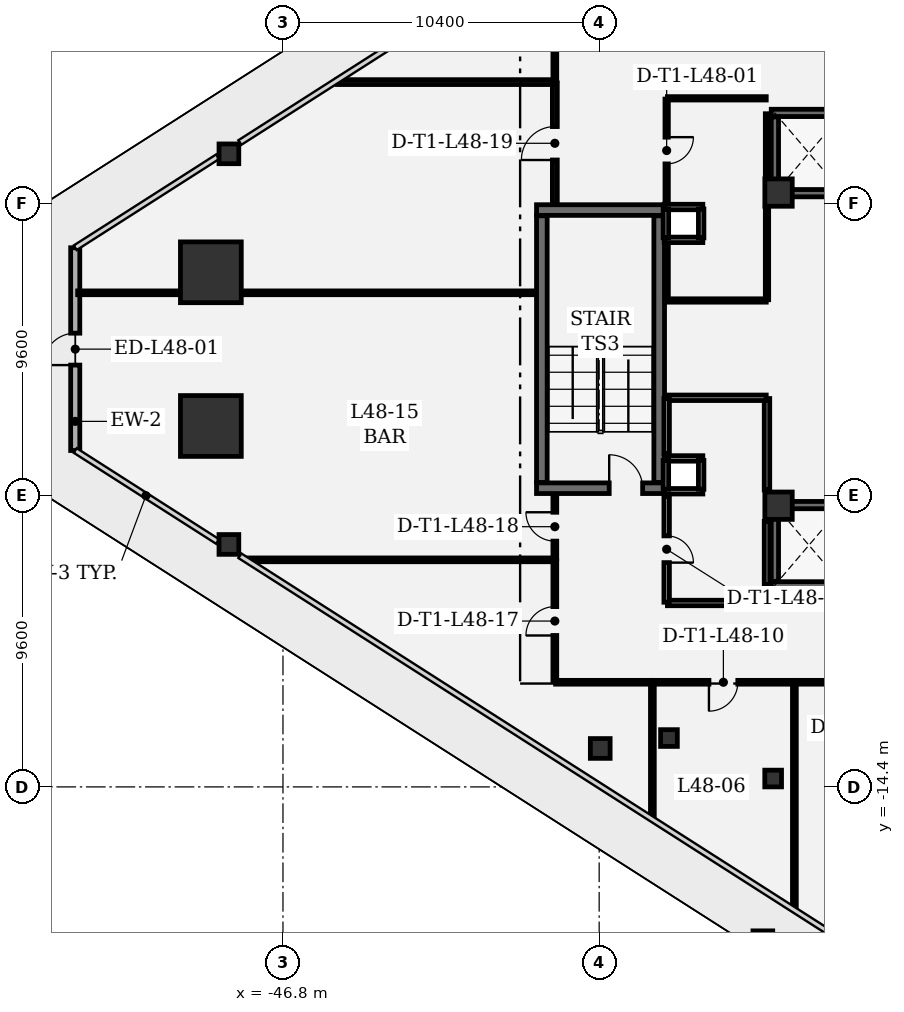
"""IFC4 building model, lengths in metres.
Left out: names, types, materials, properties, quantities, classifications, styles, units other than length and angle.
Written with IfcOpenShell. Run it as: python <this file> out.ifc"""

import sys

from ifc_helpers import new_model, si_unit, direction, frame, frame_2d, origin, origin_2d, place, context, subcontext, project, spatial, rectangle, extrude, element, fill, save


model = new_model("IFC4")
c1 = context("Model", 3, precision=1e-05, world=origin(), true_north=direction((0.0, 1.0)))
c2 = subcontext(c1, "Body", "Model", "MODEL_VIEW")
j1 = project(units=[si_unit("LENGTHUNIT", "METRE"), si_unit("PLANEANGLEUNIT", "RADIAN")], contexts=[c1])
p1 = place(None, origin())
s1 = spatial("IfcSite", under=j1, at=p1, CompositionType="ELEMENT")
p2 = place(p1, origin())
s2 = spatial("IfcBuilding", under=s1, at=p2, CompositionType="ELEMENT")
p3 = place(p2, frame((0.0, 0.0, 209.1)))
s3 = spatial("IfcBuildingStorey", under=s2, at=p3, CompositionType="ELEMENT", Elevation=209.1)
for number, where, z_axis, x_axis in (
    (1, (-49.172, 2.528, 0.0), (0.0, 0.0, 1.0), (1.0, 0.0, 0.0)),
    (2, (-49.172, -2.528, 0.0), (0.0, 0.0, 1.0), (1.0, 0.0, 0.0)),
):
    element("IfcColumn", number, at=place(p3, frame(where, z_axis=z_axis, x_axis=x_axis)), inside=s3, PredefinedType="COLUMN", context=c2, shape_type="SweptSolid", body=[
        extrude(rectangle(XDim=2.0, YDim=2.0, at=origin_2d()), origin(), (0.0, 0.0, 1.0), 4.05),
    ])
for number, where, z_axis, x_axis in (
    (3, (-30.5, 5.15, 0.0), (0.0, 0.0, 1.0), (1.0, 0.0, 0.0)),
    (4, (-30.5, -5.15, 0.0), (0.0, 0.0, 1.0), (1.0, 0.0, 0.0)),
):
    element("IfcColumn", number, at=place(p3, frame(where, z_axis=z_axis, x_axis=x_axis)), inside=s3, PredefinedType="COLUMN", context=c2, shape_type="SweptSolid", body=[
        extrude(rectangle(XDim=0.9, YDim=0.9, at=origin_2d()), origin(), (0.0, 0.0, 1.0), 4.05),
    ])
for number, where, z_axis, x_axis in (
    (5, (-31.016, -19.46, 0.0), (0.0, 0.0, 1.0), (1.0, 0.0, 0.0)),
    (6, (-48.578, 6.425, 0.0), (0.0, 0.0, 1.0), (1.0, 0.0, 0.0)),
    (7, (-48.578, -6.425, 0.0), (0.0, 0.0, 1.0), (1.0, 0.0, 0.0)),
    (8, (-36.365, -13.135, 0.0), (0.0, 0.0, 1.0), (1.0, 0.0, 0.0)),
):
    element("IfcColumn", number, at=place(p3, frame(where, z_axis=z_axis, x_axis=x_axis)), inside=s3, PredefinedType="COLUMN", context=c2, shape_type="SweptSolid", body=[
        extrude(rectangle(XDim=0.65, YDim=0.65, at=origin_2d()), origin(), (0.0, 0.0, 1.0), 4.05),
    ])
for number, where, z_axis, x_axis in (
    (9, (-34.104, -12.792, 0.0), (0.0, 0.0, 1.0), (1.0, 0.0, 0.0)),
    (10, (-30.677, -14.124, 0.0), (0.0, 0.0, 1.0), (1.0, 0.0, 0.0)),
):
    element("IfcColumn", number, at=place(p3, frame(where, z_axis=z_axis, x_axis=x_axis)), inside=s3, PredefinedType="COLUMN", context=c2, shape_type="SweptSolid", body=[
        extrude(rectangle(XDim=0.55, YDim=0.55, at=origin_2d()), origin(), (0.0, 0.0, 1.0), 4.05),
    ])
p4 = place(p3, frame((-53.633, -3.335, 0.0), z_axis=(0.0, 0.0, 1.0), x_axis=(0.0, 1.0, 0.0)))
e11 = element("IfcWall", 11, at=p4, inside=s3, PredefinedType="SOLIDWALL", context=c2, shape_type="SweptSolid", body=[
    extrude(rectangle(XDim=6.67, YDim=0.3, at=frame_2d((3.335, 0.0))), origin(), (0.0, 0.0, 1.0), 3.78),
])
p5 = place(p4, frame((2.81, 0.0, 0.0)))
e12 = element("IfcOpeningElement", 12, at=p5, cuts=e11, PredefinedType="OPENING", context=c2, shape_type="SweptSolid", body=[
    extrude(rectangle(XDim=1.05, YDim=2.2, at=frame_2d((0.525, 1.1))), frame((0.0, 0.16, 0.0), z_axis=(0.0, -1.0, 0.0), x_axis=(1.0, 0.0, 0.0)), (0.0, 0.0, 1.0), 0.32),
])
p6 = place(p3, frame((-38.46, -4.575, 0.0), z_axis=(0.0, 0.0, 1.0), x_axis=(1.0, 0.0, 0.0)))
e13 = element("IfcWall", 13, at=p6, inside=s3, PredefinedType="SHEAR", context=c2, shape_type="SweptSolid", body=[
    extrude(rectangle(XDim=4.21, YDim=0.35, at=frame_2d((2.105, 0.0))), origin(), (0.0, 0.0, 1.0), 3.78),
])
p7 = place(p6, frame((2.39, 0.0, 0.0)))
e14 = element("IfcOpeningElement", 14, at=p7, cuts=e13, PredefinedType="OPENING", context=c2, shape_type="SweptSolid", body=[
    extrude(rectangle(XDim=1.1, YDim=2.2, at=frame_2d((0.55, 1.1))), frame((0.0, 0.185, 0.0), z_axis=(0.0, -1.0, 0.0), x_axis=(1.0, 0.0, 0.0)), (0.0, 0.0, 1.0), 0.37),
])
p8 = place(p3, frame((-34.25, 4.575, 0.0), z_axis=(0.0, 0.0, 1.0), x_axis=(-1.0, 0.0, 0.0)))
e15 = element("IfcWall", 15, at=p8, inside=s3, PredefinedType="SHEAR", context=c2, shape_type="SweptSolid", body=[
    extrude(rectangle(XDim=4.21, YDim=0.35, at=frame_2d((2.105, 0.0))), origin(), (0.0, 0.0, 1.0), 3.78),
])
for number, where, z_axis, x_axis in (
    (16, (-34.425, -4.385, 0.0), (0.0, 0.0, 1.0), (0.0, 1.0, 0.0)),
    (17, (-38.285, 4.385, 0.0), (0.0, 0.0, 1.0), (0.0, -1.0, 0.0)),
):
    element("IfcWall", number, at=place(p3, frame(where, z_axis=z_axis, x_axis=x_axis)), inside=s3, PredefinedType="SHEAR", context=c2, shape_type="SweptSolid", body=[
        extrude(rectangle(XDim=8.77, YDim=0.35, at=frame_2d((4.385, 0.0))), origin(), (0.0, 0.0, 1.0), 3.78),
    ])
for number, where, z_axis, x_axis in (
    (18, (-28.26, 5.13, 0.0), (0.0, 0.0, 1.0), (-1.0, 0.0, 0.0)),
    (19, (-30.74, 7.77, 0.0), (0.0, 0.0, 1.0), (1.0, 0.0, 0.0)),
):
    element("IfcWall", number, at=place(p3, frame(where, z_axis=z_axis, x_axis=x_axis)), inside=s3, PredefinedType="SHEAR", context=c2, shape_type="SweptSolid", body=[
        extrude(rectangle(XDim=2.48, YDim=0.24, at=frame_2d((1.24, 0.0))), origin(), (0.0, 0.0, 1.0), 3.78),
    ])
p9 = place(p3, frame((-30.62, 5.262, 0.0), z_axis=(0.0, 0.0, 1.0), x_axis=(0.0, 1.0, 0.0)))
e20 = element("IfcWall", 20, at=p9, inside=s3, PredefinedType="SHEAR", context=c2, shape_type="SweptSolid", body=[
    extrude(rectangle(XDim=2.376, YDim=0.24, at=frame_2d((1.188, 0.0))), origin(), (0.0, 0.0, 1.0), 3.78),
])
for number, where, z_axis, x_axis in (
    (21, (-28.26, -7.77, 0.0), (0.0, 0.0, 1.0), (-1.0, 0.0, 0.0)),
    (22, (-30.74, -5.13, 0.0), (0.0, 0.0, 1.0), (1.0, 0.0, 0.0)),
):
    element("IfcWall", number, at=place(p3, frame(where, z_axis=z_axis, x_axis=x_axis)), inside=s3, PredefinedType="SHEAR", context=c2, shape_type="SweptSolid", body=[
        extrude(rectangle(XDim=2.48, YDim=0.24, at=frame_2d((1.24, 0.0))), origin(), (0.0, 0.0, 1.0), 3.78),
    ])
p10 = place(p3, frame((-30.62, -7.638, 0.0), z_axis=(0.0, 0.0, 1.0), x_axis=(0.0, 1.0, 0.0)))
e23 = element("IfcWall", 23, at=p10, inside=s3, PredefinedType="SHEAR", context=c2, shape_type="SweptSolid", body=[
    extrude(rectangle(XDim=2.376, YDim=0.24, at=frame_2d((1.188, 0.0))), origin(), (0.0, 0.0, 1.0), 3.78),
])
for number, where, z_axis, x_axis in (
    (24, (-32.99, 3.595, 0.0), (0.0, 0.0, 1.0), (-1.0, 0.0, 0.0)),
    (25, (-34.26, 4.675, 0.0), (0.0, 0.0, 1.0), (1.0, 0.0, 0.0)),
):
    element("IfcWall", number, at=place(p3, frame(where, z_axis=z_axis, x_axis=x_axis)), inside=s3, PredefinedType="PARTITIONING", context=c2, shape_type="SweptSolid", body=[
        extrude(rectangle(XDim=1.27, YDim=0.18, at=frame_2d((0.635, 0.0))), origin(), (0.0, 0.0, 1.0), 3.78),
    ])
for number, where, z_axis, x_axis in (
    (26, (-34.205, 3.66, 0.0), (0.0, 0.0, 1.0), (0.0, 1.0, 0.0)),
    (27, (-33.045, 4.61, 0.0), (0.0, 0.0, 1.0), (0.0, -1.0, 0.0)),
):
    element("IfcWall", number, at=place(p3, frame(where, z_axis=z_axis, x_axis=x_axis)), inside=s3, PredefinedType="PARTITIONING", context=c2, shape_type="SweptSolid", body=[
        extrude(rectangle(XDim=0.95, YDim=0.18, at=frame_2d((0.475, 0.0))), origin(), (0.0, 0.0, 1.0), 3.78),
    ])
for number, where, z_axis, x_axis in (
    (28, (-32.99, -4.675, 0.0), (0.0, 0.0, 1.0), (-1.0, 0.0, 0.0)),
    (29, (-34.26, -3.595, 0.0), (0.0, 0.0, 1.0), (1.0, 0.0, 0.0)),
):
    element("IfcWall", number, at=place(p3, frame(where, z_axis=z_axis, x_axis=x_axis)), inside=s3, PredefinedType="PARTITIONING", context=c2, shape_type="SweptSolid", body=[
        extrude(rectangle(XDim=1.27, YDim=0.18, at=frame_2d((0.635, 0.0))), origin(), (0.0, 0.0, 1.0), 3.78),
    ])
for number, where, z_axis, x_axis in (
    (30, (-34.205, -4.61, 0.0), (0.0, 0.0, 1.0), (0.0, 1.0, 0.0)),
    (31, (-33.045, -3.66, 0.0), (0.0, 0.0, 1.0), (0.0, -1.0, 0.0)),
):
    element("IfcWall", number, at=place(p3, frame(where, z_axis=z_axis, x_axis=x_axis)), inside=s3, PredefinedType="PARTITIONING", context=c2, shape_type="SweptSolid", body=[
        extrude(rectangle(XDim=0.95, YDim=0.18, at=frame_2d((0.475, 0.0))), origin(), (0.0, 0.0, 1.0), 3.78),
    ])
p11 = place(p3, frame((-34.155, 1.6, 0.0), z_axis=(0.0, 0.0, 1.0), x_axis=(1.0, 0.0, 0.0)))
e32 = element("IfcWall", 32, at=p11, inside=s3, PredefinedType="PARTITIONING", context=c2, shape_type="SweptSolid", body=[
    extrude(rectangle(XDim=3.25, YDim=0.11, at=frame_2d((1.625, 0.0))), origin(), (0.0, 0.0, 1.0), 3.78),
])
p12 = place(p3, frame((-30.88, 1.625, 0.0), z_axis=(0.0, 0.0, 1.0), x_axis=(0.0, 1.0, 0.0)))
e33 = element("IfcWall", 33, at=p12, inside=s3, PredefinedType="PARTITIONING", context=c2, shape_type="SweptSolid", body=[
    extrude(rectangle(XDim=3.01, YDim=0.11, at=frame_2d((1.505, 0.0))), origin(), (0.0, 0.0, 1.0), 3.78),
])
p13 = place(p3, frame((-30.88, 5.665, 0.0), z_axis=(0.0, 0.0, 1.0), x_axis=(0.0, 1.0, 0.0)))
e34 = element("IfcWall", 34, at=p13, inside=s3, PredefinedType="PARTITIONING", context=c2, shape_type="SweptSolid", body=[
    extrude(rectangle(XDim=2.078, YDim=0.11, at=frame_2d((1.039, 0.0))), origin(), (0.0, 0.0, 1.0), 3.78),
])
p14 = place(p3, frame((-30.905, 8.25, 0.0), z_axis=(0.0, 0.0, 1.0), x_axis=(-1.0, 0.0, 0.0)))
e35 = element("IfcWall", 35, at=p14, inside=s3, PredefinedType="PARTITIONING", context=c2, shape_type="SweptSolid", body=[
    extrude(rectangle(XDim=3.25, YDim=0.11, at=frame_2d((1.625, 0.0))), origin(), (0.0, 0.0, 1.0), 3.78),
])
p15 = place(p3, frame((-34.18, 8.225, 0.0), z_axis=(0.0, 0.0, 1.0), x_axis=(0.0, -1.0, 0.0)))
e36 = element("IfcWall", 36, at=p15, inside=s3, PredefinedType="PARTITIONING", context=c2, shape_type="SweptSolid", body=[
    extrude(rectangle(XDim=3.385, YDim=0.11, at=frame_2d((1.692, 0.0))), origin(), (0.0, 0.0, 1.0), 3.78),
])
p16 = place(p15, frame((1.252, 0.0, 0.0)))
e37 = element("IfcOpeningElement", 37, at=p16, cuts=e36, PredefinedType="OPENING", context=c2, shape_type="SweptSolid", body=[
    extrude(rectangle(XDim=0.88, YDim=2.1, at=frame_2d((0.44, 1.05))), frame((0.0, 0.065, 0.0), z_axis=(0.0, -1.0, 0.0), x_axis=(1.0, 0.0, 0.0)), (0.0, 0.0, 1.0), 0.13),
])
p17 = place(p3, frame((-34.18, 3.43, 0.0), z_axis=(0.0, 0.0, 1.0), x_axis=(0.0, -1.0, 0.0)))
e38 = element("IfcWall", 38, at=p17, inside=s3, PredefinedType="PARTITIONING", context=c2, shape_type="SweptSolid", body=[
    extrude(rectangle(XDim=1.805, YDim=0.11, at=frame_2d((0.902, 0.0))), origin(), (0.0, 0.0, 1.0), 3.78),
])
p18 = place(p3, frame((-34.155, -8.35, 0.0), z_axis=(0.0, 0.0, 1.0), x_axis=(1.0, 0.0, 0.0)))
e39 = element("IfcWall", 39, at=p18, inside=s3, PredefinedType="PARTITIONING", context=c2, shape_type="SweptSolid", body=[
    extrude(rectangle(XDim=3.25, YDim=0.18, at=frame_2d((1.625, 0.0))), origin(), (0.0, 0.0, 1.0), 3.344),
])
p19 = place(p3, frame((-30.88, -7.743, 0.0), z_axis=(0.0, 0.0, 1.0), x_axis=(0.0, 1.0, 0.0)))
e40 = element("IfcWall", 40, at=p19, inside=s3, PredefinedType="PARTITIONING", context=c2, shape_type="SweptSolid", body=[
    extrude(rectangle(XDim=2.078, YDim=0.18, at=frame_2d((1.039, 0.0))), origin(), (0.0, 0.0, 1.0), 3.78),
])
p20 = place(p3, frame((-30.88, -4.635, 0.0), z_axis=(0.0, 0.0, 1.0), x_axis=(0.0, 1.0, 0.0)))
e41 = element("IfcWall", 41, at=p20, inside=s3, PredefinedType="PARTITIONING", context=c2, shape_type="SweptSolid", body=[
    extrude(rectangle(XDim=3.01, YDim=0.18, at=frame_2d((1.505, 0.0))), origin(), (0.0, 0.0, 1.0), 3.78),
])
p21 = place(p3, frame((-30.905, -1.6, 0.0), z_axis=(0.0, 0.0, 1.0), x_axis=(-1.0, 0.0, 0.0)))
e42 = element("IfcWall", 42, at=p21, inside=s3, PredefinedType="PARTITIONING", context=c2, shape_type="SweptSolid", body=[
    extrude(rectangle(XDim=3.25, YDim=0.18, at=frame_2d((1.625, 0.0))), origin(), (0.0, 0.0, 1.0), 3.78),
])
p22 = place(p3, frame((-34.18, -1.625, 0.0), z_axis=(0.0, 0.0, 1.0), x_axis=(0.0, -1.0, 0.0)))
e43 = element("IfcWall", 43, at=p22, inside=s3, PredefinedType="PARTITIONING", context=c2, shape_type="SweptSolid", body=[
    extrude(rectangle(XDim=1.805, YDim=0.18, at=frame_2d((0.902, 0.0))), origin(), (0.0, 0.0, 1.0), 3.78),
])
p23 = place(p3, frame((-34.18, -4.84, 0.0), z_axis=(0.0, 0.0, 1.0), x_axis=(0.0, -1.0, 0.0)))
e44 = element("IfcWall", 44, at=p23, inside=s3, PredefinedType="PARTITIONING", context=c2, shape_type="SweptSolid", body=[
    extrude(rectangle(XDim=3.485, YDim=0.18, at=frame_2d((1.743, 0.0))), origin(), (0.0, 0.0, 1.0), 3.78),
])
p24 = place(p23, frame((1.302, 0.0, 0.0)))
e45 = element("IfcOpeningElement", 45, at=p24, cuts=e44, PredefinedType="OPENING", context=c2, shape_type="SweptSolid", body=[
    extrude(rectangle(XDim=0.88, YDim=2.1, at=frame_2d((0.44, 1.05))), frame((0.0, 0.1, 0.0), z_axis=(0.0, -1.0, 0.0), x_axis=(1.0, 0.0, 0.0)), (0.0, 0.0, 1.0), 0.2),
])
p25 = place(p3, frame((-30.004, -10.958, 0.0), z_axis=(0.0, 0.0, 1.0), x_axis=(-1.0, 0.0, 0.0)))
e46 = element("IfcWall", 46, at=p25, inside=s3, PredefinedType="PARTITIONING", context=c2, shape_type="SweptSolid", body=[
    extrude(rectangle(XDim=4.621, YDim=0.125, at=frame_2d((2.311, 0.0))), origin(), (0.0, 0.0, 1.0), 2.9),
])
p26 = place(p25, frame((1.835, 0.0, 0.0)))
e47 = element("IfcOpeningElement", 47, at=p26, cuts=e46, PredefinedType="OPENING", context=c2, shape_type="SweptSolid", body=[
    extrude(rectangle(XDim=0.95, YDim=2.15, at=frame_2d((0.475, 1.075))), frame((0.0, 0.073, 0.0), z_axis=(0.0, -1.0, 0.0), x_axis=(1.0, 0.0, 0.0)), (0.0, 0.0, 1.0), 0.145),
])
p27 = place(p3, frame((-34.65, -10.983, 0.0), z_axis=(0.0, 0.0, 1.0), x_axis=(0.0, -1.0, 0.0)))
e48 = element("IfcWall", 48, at=p27, inside=s3, PredefinedType="PARTITIONING", context=c2, shape_type="SweptSolid", body=[
    extrude(rectangle(XDim=4.405, YDim=0.125, at=frame_2d((2.202, 0.0))), origin(), (0.0, 0.0, 1.0), 3.78),
])
p28 = place(p3, frame((-29.979, -18.373, 0.0), z_axis=(0.0, 0.0, 1.0), x_axis=(0.0, 1.0, 0.0)))
e49 = element("IfcWall", 49, at=p28, inside=s3, PredefinedType="PARTITIONING", context=c2, shape_type="SweptSolid", body=[
    extrude(rectangle(XDim=7.39, YDim=0.125, at=frame_2d((3.695, 0.0))), origin(), (0.0, 0.0, 1.0), 3.78),
])
p29 = place(p3, frame((-24.943, -10.958, 0.0), z_axis=(0.0, 0.0, 1.0), x_axis=(-1.0, 0.0, 0.0)))
e50 = element("IfcWall", 50, at=p29, inside=s3, PredefinedType="PARTITIONING", context=c2, shape_type="SweptSolid", body=[
    extrude(rectangle(XDim=5.003, YDim=0.125, at=frame_2d((2.501, 0.0))), origin(), (0.0, 0.0, 1.0), 3.78),
])
p30 = place(p29, frame((2.026, 0.0, 0.0)))
e51 = element("IfcOpeningElement", 51, at=p30, cuts=e50, PredefinedType="OPENING", context=c2, shape_type="SweptSolid", body=[
    extrude(rectangle(XDim=0.95, YDim=2.15, at=frame_2d((0.475, 1.075))), frame((0.0, 0.073, 0.0), z_axis=(0.0, -1.0, 0.0), x_axis=(1.0, 0.0, 0.0)), (0.0, 0.0, 1.0), 0.145),
])
p31 = place(p3, frame((-37.833, -10.958, 0.0), z_axis=(0.0, 0.0, 1.0), x_axis=(1.0, 0.0, 0.0)))
e52 = element("IfcWall", 52, at=p31, inside=s3, PredefinedType="PARTITIONING", context=c2, shape_type="SweptSolid", body=[
    extrude(rectangle(XDim=3.15, YDim=0.125, at=frame_2d((1.575, 0.0))), origin(), (0.0, 0.0, 1.0), 2.9),
])
p32 = place(p3, frame((-37.858, -10.933, 0.0), z_axis=(0.0, 0.0, 1.0), x_axis=(0.0, 1.0, 0.0)))
e53 = element("IfcWall", 53, at=p32, inside=s3, PredefinedType="PARTITIONING", context=c2, shape_type="SweptSolid", body=[
    extrude(rectangle(XDim=3.977, YDim=0.125, at=frame_2d((1.989, 0.0))), origin(), (0.0, 0.0, 1.0), 3.78),
])
p33 = place(p32, frame((1.514, 0.0, 0.0)))
e54 = element("IfcOpeningElement", 54, at=p33, cuts=e53, PredefinedType="OPENING", context=c2, shape_type="SweptSolid", body=[
    extrude(rectangle(XDim=0.95, YDim=2.15, at=frame_2d((0.475, 1.075))), frame((0.0, 0.073, 0.0), z_axis=(0.0, -1.0, 0.0), x_axis=(1.0, 0.0, 0.0)), (0.0, 0.0, 1.0), 0.145),
])
p34 = place(p3, frame((-37.883, -6.931, 0.0), z_axis=(0.0, 0.0, 1.0), x_axis=(-1.0, 0.0, 0.0)))
e55 = element("IfcWall", 55, at=p34, inside=s3, PredefinedType="PARTITIONING", context=c2, shape_type="SweptSolid", body=[
    extrude(rectangle(XDim=10.044, YDim=0.125, at=frame_2d((5.022, 0.0))), origin(), (0.0, 0.0, 1.0), 2.9),
])
p35 = place(p3, frame((-37.858, -6.898, 0.0), z_axis=(0.0, 0.0, 1.0), x_axis=(0.0, 1.0, 0.0)))
e56 = element("IfcWall", 56, at=p35, inside=s3, PredefinedType="PARTITIONING", context=c2, shape_type="SweptSolid", body=[
    extrude(rectangle(XDim=2.115, YDim=0.125, at=frame_2d((1.057, 0.0))), origin(), (0.0, 0.0, 1.0), 3.78),
])
p36 = place(p35, frame((0.582, 0.0, 0.0)))
e57 = element("IfcOpeningElement", 57, at=p36, cuts=e56, PredefinedType="OPENING", context=c2, shape_type="SweptSolid", body=[
    extrude(rectangle(XDim=0.95, YDim=2.15, at=frame_2d((0.475, 1.075))), frame((0.0, 0.073, 0.0), z_axis=(0.0, -1.0, 0.0), x_axis=(1.0, 0.0, 0.0)), (0.0, 0.0, 1.0), 0.145),
])
p37 = place(p3, frame((-38.493, 1.853, 0.0), z_axis=(0.0, 0.0, 1.0), x_axis=(-1.0, 0.0, 0.0)))
e58 = element("IfcWall", 58, at=p37, inside=s3, PredefinedType="PARTITIONING", context=c2, shape_type="SweptSolid", body=[
    extrude(rectangle(XDim=9.614, YDim=0.125, at=frame_2d((4.807, 0.0))), origin(), (0.0, 0.0, 1.0), 3.78),
])
p38 = place(p3, frame((-50.237, 1.853, 0.0), z_axis=(0.0, 0.0, 1.0), x_axis=(-1.0, 0.0, 0.0)))
e59 = element("IfcWall", 59, at=p38, inside=s3, PredefinedType="PARTITIONING", context=c2, shape_type="SweptSolid", body=[
    extrude(rectangle(XDim=3.316, YDim=0.125, at=frame_2d((1.658, 0.0))), origin(), (0.0, 0.0, 1.0), 3.78),
])
p39 = place(p3, frame((-37.858, 4.783, 0.0), z_axis=(0.0, 0.0, 1.0), x_axis=(0.0, 1.0, 0.0)))
e60 = element("IfcWall", 60, at=p39, inside=s3, PredefinedType="PARTITIONING", context=c2, shape_type="SweptSolid", body=[
    extrude(rectangle(XDim=3.976, YDim=0.16, at=frame_2d((1.988, 0.0))), origin(), (0.0, 0.0, 1.0), 3.78),
])
p40 = place(p39, frame((1.438, 0.0, 0.0)))
e61 = element("IfcOpeningElement", 61, at=p40, cuts=e60, PredefinedType="OPENING", context=c2, shape_type="SweptSolid", body=[
    extrude(rectangle(XDim=1.1, YDim=2.15, at=frame_2d((0.55, 1.075))), frame((0.0, 0.09, 0.0), z_axis=(0.0, -1.0, 0.0), x_axis=(1.0, 0.0, 0.0)), (0.0, 0.0, 1.0), 0.18),
])
p41 = place(p3, frame((-37.883, 8.784, 0.0), z_axis=(0.0, 0.0, 1.0), x_axis=(-1.0, 0.0, 0.0)))
e62 = element("IfcWall", 62, at=p41, inside=s3, PredefinedType="PARTITIONING", context=c2, shape_type="SweptSolid", body=[
    extrude(rectangle(XDim=7.145, YDim=0.16, at=frame_2d((3.572, 0.0))), origin(), (0.0, 0.0, 1.0), 2.9),
])
p42 = place(p3, frame((-37.858, 8.817, 0.0), z_axis=(0.0, 0.0, 1.0), x_axis=(0.0, 1.0, 0.0)))
e63 = element("IfcWall", 63, at=p42, inside=s3, PredefinedType="PARTITIONING", context=c2, shape_type="SweptSolid", body=[
    extrude(rectangle(XDim=1.917, YDim=0.125, at=frame_2d((0.958, 0.0))), origin(), (0.0, 0.0, 1.0), 3.78),
])
p43 = place(p5, origin())
e64 = element("IfcDoor", 64, at=p43, inside=s3, OperationType="SINGLE_SWING_LEFT", PredefinedType="DOOR", context=c2, shape_type="SweptSolid", body=[
    extrude(rectangle(XDim=1.05, YDim=2.2, at=frame_2d((0.525, 1.1))), frame((0.0, 0.025, 0.0), z_axis=(0.0, -1.0, 0.0), x_axis=(1.0, 0.0, 0.0)), (0.0, 0.0, 1.0), 0.05),
])
fill(e12, e64)
p44 = place(p7, origin())
e65 = element("IfcDoor", 65, at=p44, inside=s3, OperationType="SINGLE_SWING_LEFT", PredefinedType="DOOR", context=c2, shape_type="SweptSolid", body=[
    extrude(rectangle(XDim=1.1, YDim=2.2, at=frame_2d((0.55, 1.1))), frame((0.0, 0.025, 0.0), z_axis=(0.0, -1.0, 0.0), x_axis=(1.0, 0.0, 0.0)), (0.0, 0.0, 1.0), 0.05),
])
fill(e14, e65)
p45 = place(p16, origin())
e66 = element("IfcDoor", 66, at=p45, inside=s3, OperationType="SINGLE_SWING_LEFT", PredefinedType="DOOR", context=c2, shape_type="SweptSolid", body=[
    extrude(rectangle(XDim=0.88, YDim=2.1, at=frame_2d((0.44, 1.05))), frame((0.0, 0.025, 0.0), z_axis=(0.0, -1.0, 0.0), x_axis=(1.0, 0.0, 0.0)), (0.0, 0.0, 1.0), 0.05),
])
fill(e37, e66)
p46 = place(p24, origin())
e67 = element("IfcDoor", 67, at=p46, inside=s3, OperationType="SINGLE_SWING_RIGHT", PredefinedType="DOOR", context=c2, shape_type="SweptSolid", body=[
    extrude(rectangle(XDim=0.88, YDim=2.1, at=frame_2d((0.44, 1.05))), frame((0.0, 0.025, 0.0), z_axis=(0.0, -1.0, 0.0), x_axis=(1.0, 0.0, 0.0)), (0.0, 0.0, 1.0), 0.05),
])
fill(e45, e67)
p47 = place(p26, origin())
e68 = element("IfcDoor", 68, at=p47, inside=s3, OperationType="SINGLE_SWING_RIGHT", PredefinedType="DOOR", context=c2, shape_type="SweptSolid", body=[
    extrude(rectangle(XDim=0.95, YDim=2.15, at=frame_2d((0.475, 1.075))), frame((0.0, 0.025, 0.0), z_axis=(0.0, -1.0, 0.0), x_axis=(1.0, 0.0, 0.0)), (0.0, 0.0, 1.0), 0.05),
])
fill(e47, e68)
p48 = place(p33, origin())
e69 = element("IfcDoor", 69, at=p48, inside=s3, OperationType="SINGLE_SWING_LEFT", PredefinedType="DOOR", context=c2, shape_type="SweptSolid", body=[
    extrude(rectangle(XDim=0.95, YDim=2.15, at=frame_2d((0.475, 1.075))), frame((0.0, 0.025, 0.0), z_axis=(0.0, -1.0, 0.0), x_axis=(1.0, 0.0, 0.0)), (0.0, 0.0, 1.0), 0.05),
])
fill(e54, e69)
p49 = place(p36, origin())
e70 = element("IfcDoor", 70, at=p49, inside=s3, OperationType="SINGLE_SWING_RIGHT", PredefinedType="DOOR", context=c2, shape_type="SweptSolid", body=[
    extrude(rectangle(XDim=0.95, YDim=2.15, at=frame_2d((0.475, 1.075))), frame((0.0, 0.025, 0.0), z_axis=(0.0, -1.0, 0.0), x_axis=(1.0, 0.0, 0.0)), (0.0, 0.0, 1.0), 0.05),
])
fill(e57, e70)
p50 = place(p40, origin())
e71 = element("IfcDoor", 71, at=p50, inside=s3, OperationType="SINGLE_SWING_LEFT", PredefinedType="DOOR", context=c2, shape_type="SweptSolid", body=[
    extrude(rectangle(XDim=1.1, YDim=2.15, at=frame_2d((0.55, 1.075))), frame((0.0, 0.025, 0.0), z_axis=(0.0, -1.0, 0.0), x_axis=(1.0, 0.0, 0.0)), (0.0, 0.0, 1.0), 0.05),
])
fill(e61, e71)
save(model, sys.argv[1])
